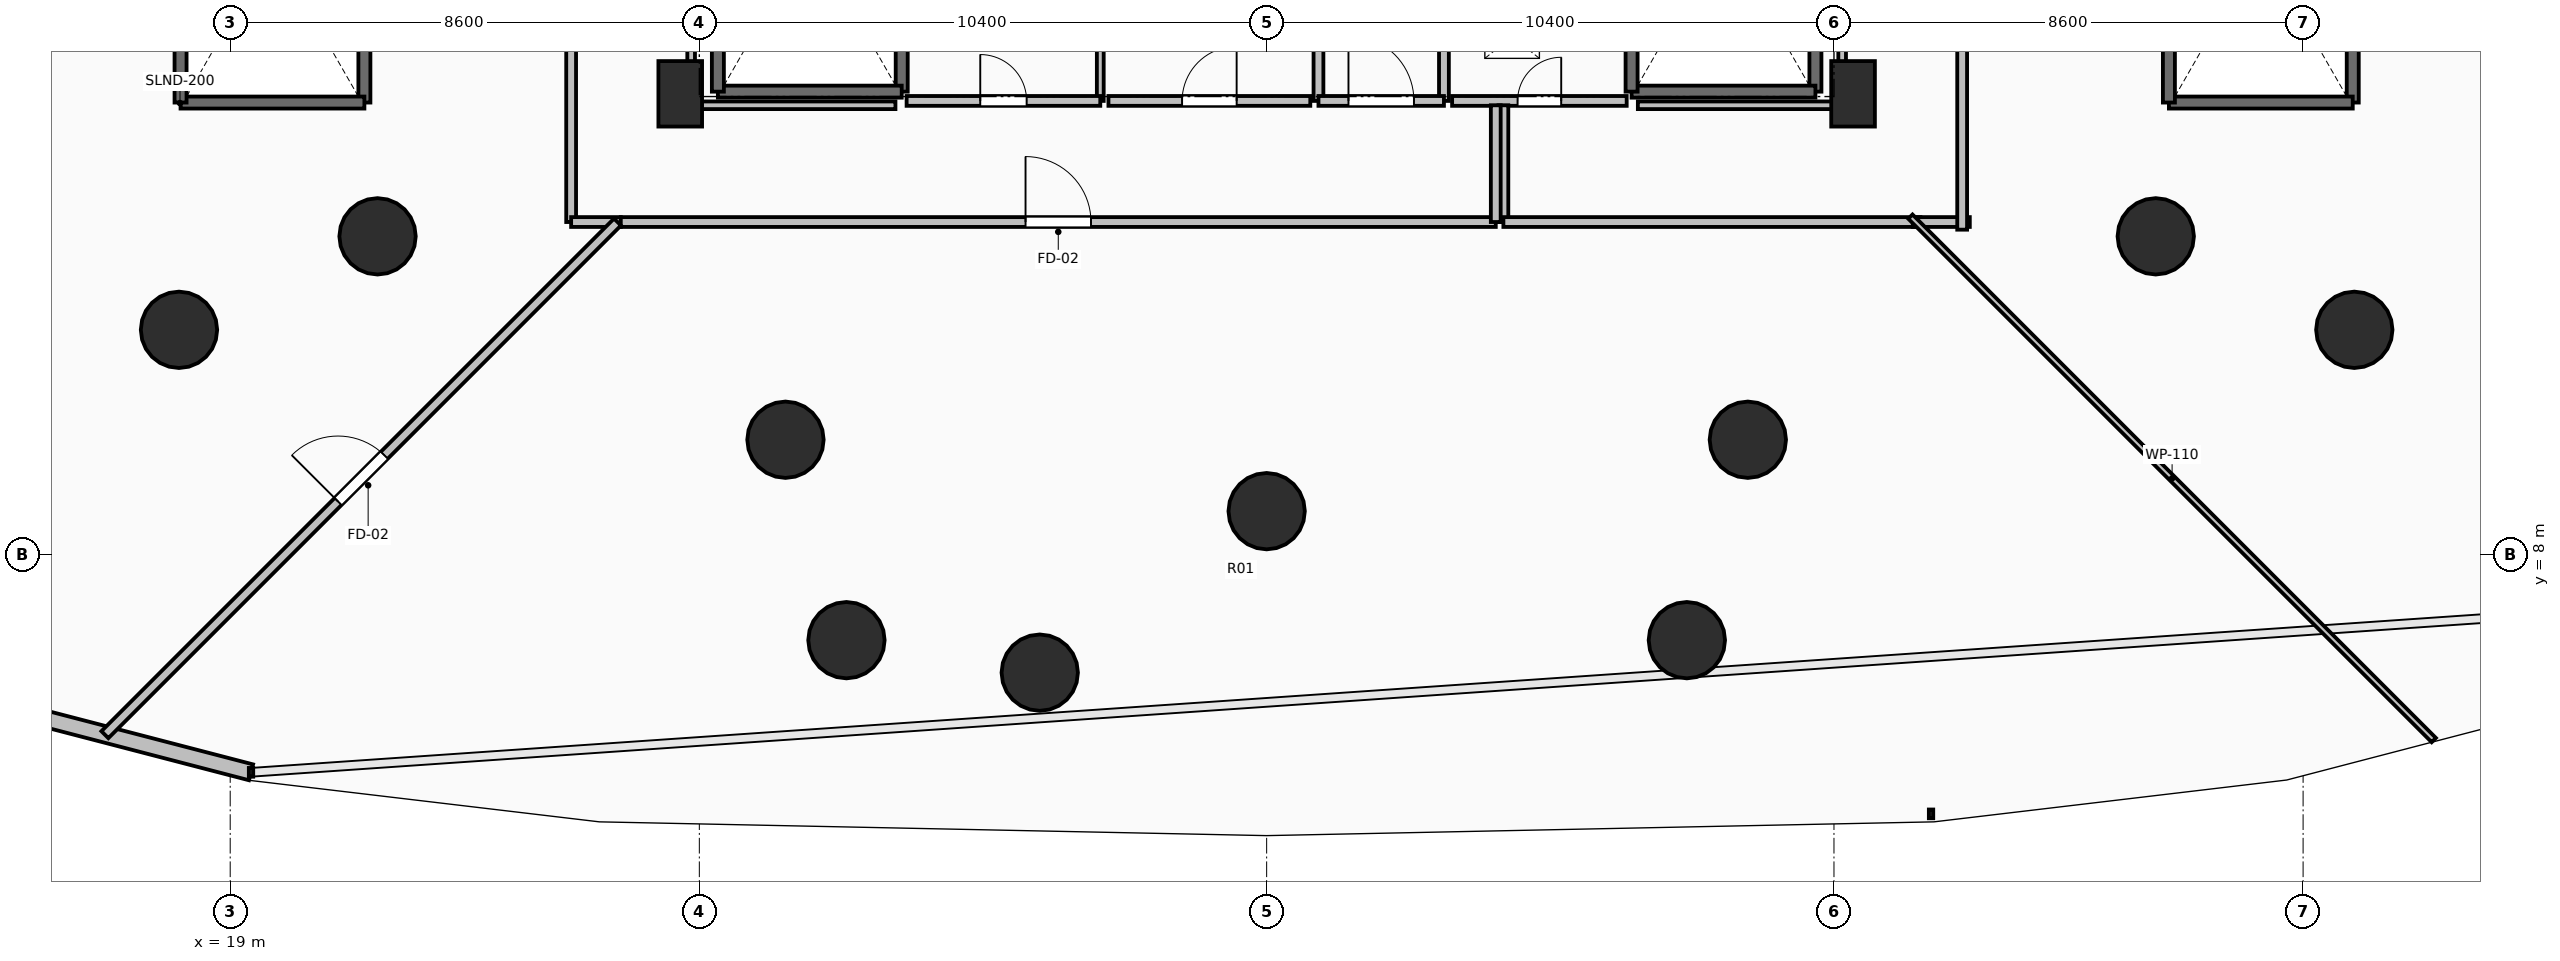
"""IFC4 building model, lengths in metres.
Left out: names, types, materials, properties, quantities, classifications, styles, units other than length and angle.
Written with IfcOpenShell. Run it as: python <this file> out.ifc"""

import sys

from ifc_helpers import new_model, si_unit, direction, frame, frame_2d, origin, origin_2d, place, context, subcontext, project, spatial, rectangle, circle, extrude, element, fill, save


model = new_model("IFC4")
c1 = context("Model", 3, precision=1e-05, world=origin(), true_north=direction((0.0, 1.0)))
c2 = subcontext(c1, "Body", "Model", "MODEL_VIEW")
j1 = project(units=[si_unit("LENGTHUNIT", "METRE"), si_unit("PLANEANGLEUNIT", "RADIAN")], contexts=[c1])
p1 = place(None, origin())
s1 = spatial("IfcSite", under=j1, at=p1, CompositionType="ELEMENT")
p2 = place(p1, origin())
s2 = spatial("IfcBuilding", under=s1, at=p2, CompositionType="ELEMENT")
p3 = place(p2, frame((0.0, 0.0, 14.4)))
s3 = spatial("IfcBuildingStorey", under=s2, at=p3, CompositionType="ELEMENT", Elevation=14.4)
for number, where, z_axis, x_axis in (
    (1, (21.701, 13.838, 0.0), (0.0, 0.0, 1.0), (-0.707, -0.707, 0.0)),
    (2, (29.179, 10.109, 0.0), (0.0, 0.0, 1.0), (-0.383, -0.924, 0.0)),
    (3, (38.0, 8.8, 0.0), (0.0, 0.0, 1.0), (0.0, -1.0, 0.0)),
    (4, (46.821, 10.109, 0.0), (0.0, 0.0, 1.0), (0.383, -0.924, 0.0)),
    (5, (54.299, 13.838, 0.0), (0.0, 0.0, 1.0), (0.707, -0.707, 0.0)),
    (6, (18.061, 12.124, 0.0), (0.0, 0.0, 1.0), (-0.707, -0.707, 0.0)),
    (7, (30.297, 6.435, 0.0), (0.0, 0.0, 1.0), (-0.383, -0.924, 0.0)),
    (8, (33.84, 5.84, 0.0), (0.0, 0.0, 1.0), (0.0, -1.0, 0.0)),
    (9, (45.703, 6.435, 0.0), (0.0, 0.0, 1.0), (0.383, -0.924, 0.0)),
    (10, (57.939, 12.124, 0.0), (0.0, 0.0, 1.0), (0.707, -0.707, 0.0)),
):
    element("IfcColumn", number, at=place(p3, frame(where, z_axis=z_axis, x_axis=x_axis)), inside=s3, PredefinedType="COLUMN", context=c2, shape_type="SweptSolid", body=[
        extrude(circle(Radius=0.7, at=origin_2d()), origin(), (0.0, 0.0, 1.0), 4.8),
    ])
for number, where, z_axis, x_axis in (
    (11, (27.25, 16.45, 0.0), (0.0, 0.0, 1.0), (1.0, 0.0, 0.0)),
    (12, (48.75, 16.45, 0.0), (0.0, 0.0, 1.0), (1.0, 0.0, 0.0)),
):
    element("IfcColumn", number, at=place(p3, frame(where, z_axis=z_axis, x_axis=x_axis)), inside=s3, PredefinedType="PILASTER", context=c2, shape_type="SweptSolid", body=[
        extrude(rectangle(XDim=0.8, YDim=1.2, at=origin_2d()), origin(), (0.0, 0.0, 1.0), 4.8),
    ])
p4 = place(p3, frame((14.381, 5.313, 0.0), z_axis=(0.0, 0.0, 1.0), x_axis=(0.967814681155, -0.251663948434, 0.0)))
e13 = element("IfcWall", 13, at=p4, inside=s3, PredefinedType="STANDARD", context=c2, shape_type="SweptSolid", body=[
    extrude(rectangle(XDim=5.167, YDim=0.3, at=frame_2d((2.583, 0.0))), origin(), (0.0, 0.0, 1.0), 4.48),
])
p5 = place(p3, frame((31.31, 23.91, 0.0), z_axis=(0.0, 0.0, 1.0), x_axis=(0.0, -1.0, 0.0)))
e14 = element("IfcWall", 14, at=p5, inside=s3, PredefinedType="SOLIDWALL", context=c2, shape_type="SweptSolid", body=[
    extrude(rectangle(XDim=7.42, YDim=0.22, at=frame_2d((3.71, 0.0))), origin(), (0.0, 0.0, 1.0), 4.48),
])
p6 = place(p3, frame((31.31, 16.49, 0.0), z_axis=(0.0, 0.0, 1.0), x_axis=(-1.0, 0.0, 0.0)))
e15 = element("IfcWall", 15, at=p6, inside=s3, PredefinedType="SOLIDWALL", context=c2, shape_type="SweptSolid", body=[
    extrude(rectangle(XDim=3.37, YDim=0.22, at=frame_2d((1.685, 0.0))), origin(), (0.0, 0.0, 1.0), 4.48),
])
for number, where, z_axis, x_axis in (
    (16, (27.94, 16.49, 0.0), (0.0, 0.0, 1.0), (0.0, 1.0, 0.0)),
    (17, (48.06, 23.91, 0.0), (0.0, 0.0, 1.0), (0.0, -1.0, 0.0)),
):
    element("IfcWall", number, at=place(p3, frame(where, z_axis=z_axis, x_axis=x_axis)), inside=s3, PredefinedType="SOLIDWALL", context=c2, shape_type="SweptSolid", body=[
        extrude(rectangle(XDim=7.42, YDim=0.22, at=frame_2d((3.71, 0.0))), origin(), (0.0, 0.0, 1.0), 4.48),
    ])
p7 = place(p3, frame((48.06, 16.49, 0.0), z_axis=(0.0, 0.0, 1.0), x_axis=(-1.0, 0.0, 0.0)))
e18 = element("IfcWall", 18, at=p7, inside=s3, PredefinedType="SOLIDWALL", context=c2, shape_type="SweptSolid", body=[
    extrude(rectangle(XDim=3.37, YDim=0.22, at=frame_2d((1.685, 0.0))), origin(), (0.0, 0.0, 1.0), 4.48),
])
for number, where, z_axis, x_axis in (
    (19, (44.69, 16.49, 0.0), (0.0, 0.0, 1.0), (0.0, 1.0, 0.0)),
    (20, (21.46, 23.71, 0.0), (0.0, 0.0, 1.0), (0.0, -1.0, 0.0)),
):
    element("IfcWall", number, at=place(p3, frame(where, z_axis=z_axis, x_axis=x_axis)), inside=s3, PredefinedType="SOLIDWALL", context=c2, shape_type="SweptSolid", body=[
        extrude(rectangle(XDim=7.42, YDim=0.22, at=frame_2d((3.71, 0.0))), origin(), (0.0, 0.0, 1.0), 4.48),
    ])
p8 = place(p3, frame((21.46, 16.29, 0.0), z_axis=(0.0, 0.0, 1.0), x_axis=(-1.0, 0.0, 0.0)))
e21 = element("IfcWall", 21, at=p8, inside=s3, PredefinedType="SOLIDWALL", context=c2, shape_type="SweptSolid", body=[
    extrude(rectangle(XDim=3.37, YDim=0.22, at=frame_2d((1.685, 0.0))), origin(), (0.0, 0.0, 1.0), 4.48),
])
for number, where, z_axis, x_axis in (
    (22, (18.09, 16.29, 0.0), (0.0, 0.0, 1.0), (0.0, 1.0, 0.0)),
    (23, (57.91, 23.71, 0.0), (0.0, 0.0, 1.0), (0.0, -1.0, 0.0)),
):
    element("IfcWall", number, at=place(p3, frame(where, z_axis=z_axis, x_axis=x_axis)), inside=s3, PredefinedType="SOLIDWALL", context=c2, shape_type="SweptSolid", body=[
        extrude(rectangle(XDim=7.42, YDim=0.22, at=frame_2d((3.71, 0.0))), origin(), (0.0, 0.0, 1.0), 4.48),
    ])
p9 = place(p3, frame((57.91, 16.29, 0.0), z_axis=(0.0, 0.0, 1.0), x_axis=(-1.0, 0.0, 0.0)))
e24 = element("IfcWall", 24, at=p9, inside=s3, PredefinedType="SOLIDWALL", context=c2, shape_type="SweptSolid", body=[
    extrude(rectangle(XDim=3.37, YDim=0.22, at=frame_2d((1.685, 0.0))), origin(), (0.0, 0.0, 1.0), 4.48),
])
p10 = place(p3, frame((54.54, 16.29, 0.0), z_axis=(0.0, 0.0, 1.0), x_axis=(0.0, 1.0, 0.0)))
e25 = element("IfcWall", 25, at=p10, inside=s3, PredefinedType="SOLIDWALL", context=c2, shape_type="SweptSolid", body=[
    extrude(rectangle(XDim=7.42, YDim=0.22, at=frame_2d((3.71, 0.0))), origin(), (0.0, 0.0, 1.0), 4.48),
])
p11 = place(p3, frame((41.25, 16.32, 0.0), z_axis=(0.0, 0.0, 1.0), x_axis=(0.0, 1.0, 0.0)))
e26 = element("IfcWall", 26, at=p11, inside=s3, PredefinedType="PARTITIONING", context=c2, shape_type="SweptSolid", body=[
    extrude(rectangle(XDim=3.985, YDim=0.18, at=frame_2d((1.992, 0.0))), origin(), (0.0, 0.0, 1.0), 4.48),
])
p12 = place(p11, frame((1.593, 0.0, 0.0)))
e27 = element("IfcOpeningElement", 27, at=p12, cuts=e26, PredefinedType="OPENING", context=c2, shape_type="SweptSolid", body=[
    extrude(rectangle(XDim=0.8, YDim=2.05, at=frame_2d((0.4, 1.025))), frame((0.0, 0.105, 0.0), z_axis=(0.0, -1.0, 0.0), x_axis=(1.0, 0.0, 0.0)), (0.0, 0.0, 1.0), 0.21),
])
p13 = place(p3, frame((38.95, 21.755, 0.0), z_axis=(0.0, 0.0, 1.0), x_axis=(0.0, -1.0, 0.0)))
e28 = element("IfcWall", 28, at=p13, inside=s3, PredefinedType="PARTITIONING", context=c2, shape_type="SweptSolid", body=[
    extrude(rectangle(XDim=5.435, YDim=0.18, at=frame_2d((2.717, 0.0))), origin(), (0.0, 0.0, 1.0), 4.48),
])
p14 = place(p13, frame((2.218, 0.0, 0.0)))
e29 = element("IfcOpeningElement", 29, at=p14, cuts=e28, PredefinedType="OPENING", context=c2, shape_type="SweptSolid", body=[
    extrude(rectangle(XDim=1.0, YDim=2.15, at=frame_2d((0.5, 1.075))), frame((0.0, 0.105, 0.0), z_axis=(0.0, -1.0, 0.0), x_axis=(1.0, 0.0, 0.0)), (0.0, 0.0, 1.0), 0.21),
])
p15 = place(p3, frame((38.95, 16.32, 0.0), z_axis=(0.0, 0.0, 1.0), x_axis=(1.0, 0.0, 0.0)))
e30 = element("IfcWall", 30, at=p15, inside=s3, PredefinedType="PARTITIONING", context=c2, shape_type="SweptSolid", body=[
    extrude(rectangle(XDim=2.3, YDim=0.18, at=frame_2d((1.15, 0.0))), origin(), (0.0, 0.0, 1.0), 4.48),
])
p16 = place(p15, frame((0.55, 0.0, 0.0)))
e31 = element("IfcOpeningElement", 31, at=p16, cuts=e30, PredefinedType="OPENING", context=c2, shape_type="SweptSolid", body=[
    extrude(rectangle(XDim=1.2, YDim=2.15, at=frame_2d((0.6, 1.075))), frame((0.0, 0.105, 0.0), z_axis=(0.0, -1.0, 0.0), x_axis=(1.0, 0.0, 0.0)), (0.0, 0.0, 1.0), 0.21),
])
p17 = place(p3, frame((41.4, 16.32, 0.0), z_axis=(0.0, 0.0, 1.0), x_axis=(1.0, 0.0, 0.0)))
e32 = element("IfcWall", 32, at=p17, inside=s3, PredefinedType="PARTITIONING", context=c2, shape_type="SweptSolid", body=[
    extrude(rectangle(XDim=3.2, YDim=0.18, at=frame_2d((1.6, 0.0))), origin(), (0.0, 0.0, 1.0), 4.48),
])
p18 = place(p17, frame((1.2, 0.0, 0.0)))
e33 = element("IfcOpeningElement", 33, at=p18, cuts=e32, PredefinedType="OPENING", context=c2, shape_type="SweptSolid", body=[
    extrude(rectangle(XDim=0.8, YDim=2.05, at=frame_2d((0.4, 1.025))), frame((0.0, 0.105, 0.0), z_axis=(0.0, -1.0, 0.0), x_axis=(1.0, 0.0, 0.0)), (0.0, 0.0, 1.0), 0.21),
])
p19 = place(p3, frame((34.95, 16.32, 0.0), z_axis=(0.0, 0.0, 1.0), x_axis=(0.0, 1.0, 0.0)))
e34 = element("IfcWall", 34, at=p19, inside=s3, PredefinedType="PARTITIONING", context=c2, shape_type="SweptSolid", body=[
    extrude(rectangle(XDim=5.13, YDim=0.125, at=frame_2d((2.565, 0.0))), origin(), (0.0, 0.0, 1.0), 4.48),
])
p20 = place(p3, frame((31.4, 16.32, 0.0), z_axis=(0.0, 0.0, 1.0), x_axis=(1.0, 0.0, 0.0)))
e35 = element("IfcWall", 35, at=p20, inside=s3, PredefinedType="PARTITIONING", context=c2, shape_type="SweptSolid", body=[
    extrude(rectangle(XDim=3.55, YDim=0.18, at=frame_2d((1.775, 0.0))), origin(), (0.0, 0.0, 1.0), 4.48),
])
p21 = place(p20, frame((1.35, 0.0, 0.0)))
e36 = element("IfcOpeningElement", 36, at=p21, cuts=e35, PredefinedType="OPENING", context=c2, shape_type="SweptSolid", body=[
    extrude(rectangle(XDim=0.85, YDim=2.1, at=frame_2d((0.425, 1.05))), frame((0.0, 0.105, 0.0), z_axis=(0.0, -1.0, 0.0), x_axis=(1.0, 0.0, 0.0)), (0.0, 0.0, 1.0), 0.21),
])
p22 = place(p3, frame((35.1, 16.32, 0.0), z_axis=(0.0, 0.0, 1.0), x_axis=(1.0, 0.0, 0.0)))
e37 = element("IfcWall", 37, at=p22, inside=s3, PredefinedType="PARTITIONING", context=c2, shape_type="SweptSolid", body=[
    extrude(rectangle(XDim=3.7, YDim=0.18, at=frame_2d((1.85, 0.0))), origin(), (0.0, 0.0, 1.0), 4.48),
])
p23 = place(p22, frame((1.35, 0.0, 0.0)))
e38 = element("IfcOpeningElement", 38, at=p23, cuts=e37, PredefinedType="OPENING", context=c2, shape_type="SweptSolid", body=[
    extrude(rectangle(XDim=1.0, YDim=2.15, at=frame_2d((0.5, 1.075))), frame((0.0, 0.105, 0.0), z_axis=(0.0, -1.0, 0.0), x_axis=(1.0, 0.0, 0.0)), (0.0, 0.0, 1.0), 0.21),
])
p24 = place(p3, frame((25.25, 31.221, 0.0), z_axis=(0.0, 0.0, 1.0), x_axis=(0.0, -1.0, 0.0)))
e39 = element("IfcWall", 39, at=p24, inside=s3, PredefinedType="PARTITIONING", context=c2, shape_type="SweptSolid", body=[
    extrude(rectangle(XDim=17.121, YDim=0.18, at=frame_2d((8.561, 0.0))), origin(), (0.0, 0.0, 1.0), 3.672),
])
p25 = place(p24, frame((7.96, 0.0, 0.0)))
e40 = element("IfcOpeningElement", 40, at=p25, cuts=e39, PredefinedType="OPENING", context=c2, shape_type="SweptSolid", body=[
    extrude(rectangle(XDim=1.2, YDim=2.15, at=frame_2d((0.6, 1.075))), frame((0.0, 0.105, 0.0), z_axis=(0.0, -1.0, 0.0), x_axis=(1.0, 0.0, 0.0)), (0.0, 0.0, 1.0), 0.21),
])
p26 = place(p3, frame((25.25, 14.1, 0.0), z_axis=(0.0, 0.0, 1.0), x_axis=(1.0, 0.0, 0.0)))
e41 = element("IfcWall", 41, at=p26, inside=s3, PredefinedType="PARTITIONING", context=c2, shape_type="SweptSolid", body=[
    extrude(rectangle(XDim=0.91, YDim=0.18, at=frame_2d((0.455, 0.0))), origin(), (0.0, 0.0, 1.0), 4.114),
])
p27 = place(p3, frame((42.34, 16.24, 0.0), z_axis=(0.0, 0.0, 1.0), x_axis=(0.0, -1.0, 0.0)))
e42 = element("IfcWall", 42, at=p27, inside=s3, PredefinedType="PARTITIONING", context=c2, shape_type="SweptSolid", body=[
    extrude(rectangle(XDim=2.14, YDim=0.18, at=frame_2d((1.07, 0.0))), origin(), (0.0, 0.0, 1.0), 4.48),
])
p28 = place(p3, frame((42.34, 14.1, 0.0), z_axis=(0.0, 0.0, 1.0), x_axis=(1.0, 0.0, 0.0)))
e43 = element("IfcWall", 43, at=p28, inside=s3, PredefinedType="PARTITIONING", context=c2, shape_type="SweptSolid", body=[
    extrude(rectangle(XDim=7.645, YDim=0.18, at=frame_2d((3.823, 0.0))), origin(), (0.0, 0.0, 1.0), 3.672),
])
p29 = place(p3, frame((26.16, 14.1, 0.0), z_axis=(0.0, 0.0, 1.0), x_axis=(1.0, 0.0, 0.0)))
e44 = element("IfcWall", 44, at=p29, inside=s3, PredefinedType="PARTITIONING", context=c2, shape_type="SweptSolid", body=[
    extrude(rectangle(XDim=16.04, YDim=0.18, at=frame_2d((8.02, 0.0))), origin(), (0.0, 0.0, 1.0), 3.672),
])
p30 = place(p29, frame((7.42, 0.0, 0.0)))
e45 = element("IfcOpeningElement", 45, at=p30, cuts=e44, PredefinedType="OPENING", context=c2, shape_type="SweptSolid", body=[
    extrude(rectangle(XDim=1.2, YDim=2.15, at=frame_2d((0.6, 1.075))), frame((0.0, 0.105, 0.0), z_axis=(0.0, -1.0, 0.0), x_axis=(1.0, 0.0, 0.0)), (0.0, 0.0, 1.0), 0.21),
])
p31 = place(p3, frame((42.2, 14.1, 0.0), z_axis=(0.0, 0.0, 1.0), x_axis=(0.0, 1.0, 0.0)))
e46 = element("IfcWall", 46, at=p31, inside=s3, PredefinedType="PARTITIONING", context=c2, shape_type="SweptSolid", body=[
    extrude(rectangle(XDim=2.14, YDim=0.18, at=frame_2d((1.07, 0.0))), origin(), (0.0, 0.0, 1.0), 4.48),
])
p32 = place(p3, frame((49.845, 14.1, 0.0), z_axis=(0.0, 0.0, 1.0), x_axis=(1.0, 0.0, 0.0)))
e47 = element("IfcWall", 47, at=p32, inside=s3, PredefinedType="PARTITIONING", context=c2, shape_type="SweptSolid", body=[
    extrude(rectangle(XDim=1.045, YDim=0.18, at=frame_2d((0.522, 0.0))), origin(), (0.0, 0.0, 1.0), 4.114),
])
p33 = place(p3, frame((50.75, 13.96, 0.0), z_axis=(0.0, 0.0, 1.0), x_axis=(0.0, 1.0, 0.0)))
e48 = element("IfcWall", 48, at=p33, inside=s3, PredefinedType="PARTITIONING", context=c2, shape_type="SweptSolid", body=[
    extrude(rectangle(XDim=17.526, YDim=0.18, at=frame_2d((8.763, 0.0))), origin(), (0.0, 0.0, 1.0), 3.672),
])
p34 = place(p33, frame((8.263, 0.0, 0.0)))
e49 = element("IfcOpeningElement", 49, at=p34, cuts=e48, PredefinedType="OPENING", context=c2, shape_type="SweptSolid", body=[
    extrude(rectangle(XDim=1.0, YDim=2.15, at=frame_2d((0.5, 1.075))), frame((0.0, 0.105, 0.0), z_axis=(0.0, -1.0, 0.0), x_axis=(1.0, 0.0, 0.0)), (0.0, 0.0, 1.0), 0.21),
])
p35 = place(p3, frame((16.703, 4.703, 0.0), z_axis=(0.0, 0.0, 1.0), x_axis=(0.707106781187, 0.707106781187, 0.0)))
e50 = element("IfcWall", 50, at=p35, inside=s3, PredefinedType="PARTITIONING", context=c2, shape_type="SweptSolid", body=[
    extrude(rectangle(XDim=13.29, YDim=0.18, at=frame_2d((6.645, 0.0))), origin(), (0.0, 0.0, 1.0), 3.769),
])
p36 = place(p35, frame((6.045, 0.0, 0.0)))
e51 = element("IfcOpeningElement", 51, at=p36, cuts=e50, PredefinedType="OPENING", context=c2, shape_type="SweptSolid", body=[
    extrude(rectangle(XDim=1.2, YDim=2.15, at=frame_2d((0.6, 1.075))), frame((0.0, 0.105, 0.0), z_axis=(0.0, -1.0, 0.0), x_axis=(1.0, 0.0, 0.0)), (0.0, 0.0, 1.0), 0.21),
])
p37 = place(p3, frame((59.396, 4.604, 0.0), z_axis=(0.0, 0.0, 1.0), x_axis=(-0.707106781187, 0.707106781187, 0.0)))
e52 = element("IfcWall", 52, at=p37, inside=s3, PredefinedType="PARTITIONING", context=c2, shape_type="SweptSolid", body=[
    extrude(rectangle(XDim=13.569, YDim=0.11, at=frame_2d((6.785, 0.0))), origin(), (0.0, 0.0, 1.0), 3.769),
])
p38 = place(p3, frame((48.55, 23.754, 0.0), z_axis=(0.0, 0.0, 1.0), x_axis=(0.0, -1.0, 0.0)))
e53 = element("IfcWall", 53, at=p38, inside=s3, PredefinedType="PARTITIONING", context=c2, shape_type="SweptSolid", body=[
    extrude(rectangle(XDim=7.514, YDim=0.14, at=frame_2d((3.757, 0.0))), origin(), (0.0, 0.0, 1.0), 2.406),
])
for number, where, z_axis, x_axis in (
    (54, (48.55, 16.24, 0.0), (0.0, 0.0, 1.0), (-1.0, 0.0, 0.0)),
    (55, (31.195, 16.24, 0.0), (0.0, 0.0, 1.0), (-1.0, 0.0, 0.0)),
):
    element("IfcWall", number, at=place(p3, frame(where, z_axis=z_axis, x_axis=x_axis)), inside=s3, PredefinedType="PARTITIONING", context=c2, shape_type="SweptSolid", body=[
        extrude(rectangle(XDim=3.745, YDim=0.14, at=frame_2d((1.873, 0.0))), origin(), (0.0, 0.0, 1.0), 3.672),
    ])
p39 = place(p3, frame((27.45, 16.24, 0.0), z_axis=(0.0, 0.0, 1.0), x_axis=(0.0, 1.0, 0.0)))
e56 = element("IfcWall", 56, at=p39, inside=s3, PredefinedType="PARTITIONING", context=c2, shape_type="SweptSolid", body=[
    extrude(rectangle(XDim=7.514, YDim=0.14, at=frame_2d((3.757, 0.0))), origin(), (0.0, 0.0, 1.0), 2.406),
])
p40 = place(p16, origin())
e57 = element("IfcDoor", 57, at=p40, inside=s3, OperationType="SINGLE_SWING_LEFT", PredefinedType="DOOR", context=c2, shape_type="SweptSolid", body=[
    extrude(rectangle(XDim=1.2, YDim=2.15, at=frame_2d((0.6, 1.075))), frame((0.0, 0.025, 0.0), z_axis=(0.0, -1.0, 0.0), x_axis=(1.0, 0.0, 0.0)), (0.0, 0.0, 1.0), 0.05),
])
fill(e31, e57)
p41 = place(p18, origin())
e58 = element("IfcDoor", 58, at=p41, inside=s3, OperationType="SINGLE_SWING_RIGHT", PredefinedType="DOOR", context=c2, shape_type="SweptSolid", body=[
    extrude(rectangle(XDim=0.8, YDim=2.05, at=frame_2d((0.4, 1.025))), frame((0.0, 0.025, 0.0), z_axis=(0.0, -1.0, 0.0), x_axis=(1.0, 0.0, 0.0)), (0.0, 0.0, 1.0), 0.05),
])
fill(e33, e58)
p42 = place(p21, origin())
e59 = element("IfcDoor", 59, at=p42, inside=s3, OperationType="SINGLE_SWING_LEFT", PredefinedType="DOOR", context=c2, shape_type="SweptSolid", body=[
    extrude(rectangle(XDim=0.85, YDim=2.1, at=frame_2d((0.425, 1.05))), frame((0.0, 0.025, 0.0), z_axis=(0.0, -1.0, 0.0), x_axis=(1.0, 0.0, 0.0)), (0.0, 0.0, 1.0), 0.05),
])
fill(e36, e59)
p43 = place(p23, origin())
e60 = element("IfcDoor", 60, at=p43, inside=s3, OperationType="SINGLE_SWING_RIGHT", PredefinedType="DOOR", context=c2, shape_type="SweptSolid", body=[
    extrude(rectangle(XDim=1.0, YDim=2.15, at=frame_2d((0.5, 1.075))), frame((0.0, 0.025, 0.0), z_axis=(0.0, -1.0, 0.0), x_axis=(1.0, 0.0, 0.0)), (0.0, 0.0, 1.0), 0.05),
])
fill(e38, e60)
p44 = place(p30, origin())
e61 = element("IfcDoor", 61, at=p44, inside=s3, OperationType="SINGLE_SWING_LEFT", PredefinedType="DOOR", context=c2, shape_type="SweptSolid", body=[
    extrude(rectangle(XDim=1.2, YDim=2.15, at=frame_2d((0.6, 1.075))), frame((0.0, 0.025, 0.0), z_axis=(0.0, -1.0, 0.0), x_axis=(1.0, 0.0, 0.0)), (0.0, 0.0, 1.0), 0.05),
])
fill(e45, e61)
p45 = place(p36, origin())
e62 = element("IfcDoor", 62, at=p45, inside=s3, OperationType="SINGLE_SWING_LEFT", PredefinedType="DOOR", context=c2, shape_type="SweptSolid", body=[
    extrude(rectangle(XDim=1.2, YDim=2.15, at=frame_2d((0.6, 1.075))), frame((0.0, 0.025, 0.0), z_axis=(0.0, -1.0, 0.0), x_axis=(1.0, 0.0, 0.0)), (0.0, 0.0, 1.0), 0.05),
])
fill(e51, e62)
save(model, sys.argv[1])
